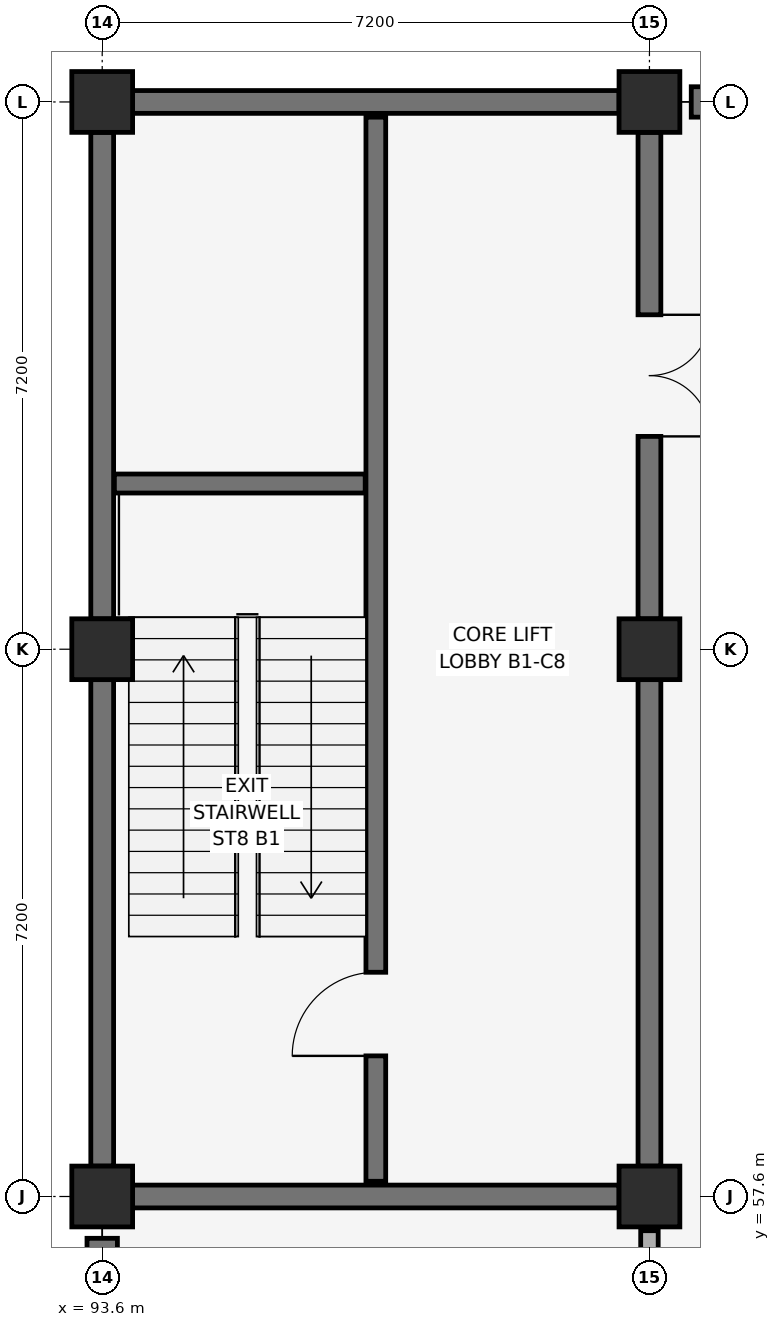
"""IFC4 building model, lengths in metres.
Left out: names, types, materials, properties, quantities, classifications, styles, units other than length and angle.
Written with IfcOpenShell. Run it as: python <this file> out.ifc"""

import sys

from ifc_helpers import new_model, si_unit, direction, frame, frame_2d, origin, origin_2d, place, context, subcontext, project, spatial, rectangle, circle, extrude, element, fill, save


model = new_model("IFC4")
c1 = context("Model", 3, precision=1e-05, world=origin(), true_north=direction((0.0, 1.0)))
c2 = subcontext(c1, "Body", "Model", "MODEL_VIEW")
j1 = project(units=[si_unit("LENGTHUNIT", "METRE"), si_unit("PLANEANGLEUNIT", "RADIAN")], contexts=[c1])
p1 = place(None, origin())
s1 = spatial("IfcSite", under=j1, at=p1, CompositionType="ELEMENT")
p2 = place(p1, origin())
s2 = spatial("IfcBuilding", under=s1, at=p2, CompositionType="ELEMENT")
p3 = place(p2, frame((0.0, 0.0, -5.4)))
s3 = spatial("IfcBuildingStorey", under=s2, at=p3, CompositionType="ELEMENT", Elevation=-5.4)
for number, where, z_axis, x_axis in (
    (1, (93.6, 57.6, -0.45), (0.0, 0.0, 1.0), (1.0, 0.0, 0.0)),
    (2, (93.6, 64.8, -0.45), (0.0, 0.0, 1.0), (1.0, 0.0, 0.0)),
    (3, (93.6, 72.0, -0.45), (0.0, 0.0, 1.0), (1.0, 0.0, 0.0)),
):
    element("IfcColumn", number, at=place(p3, frame(where, z_axis=z_axis, x_axis=x_axis)), inside=s3, PredefinedType="COLUMN", context=c2, shape_type="SweptSolid", body=[
        extrude(rectangle(XDim=0.8, YDim=0.8, at=origin_2d()), origin(), (0.0, 0.0, 1.0), 5.85),
    ])
for number, where, z_axis, x_axis in (
    (4, (100.8, 57.6, -0.45), (0.0, 0.0, 1.0), (1.0, 0.0, 0.0)),
    (5, (100.8, 64.8, -0.45), (0.0, 0.0, 1.0), (1.0, 0.0, 0.0)),
    (6, (100.8, 72.0, -0.45), (0.0, 0.0, 1.0), (1.0, 0.0, 0.0)),
):
    element("IfcColumn", number, at=place(p3, frame(where, z_axis=z_axis, x_axis=x_axis)), inside=s3, PredefinedType="COLUMN", context=c2, shape_type="SweptSolid", body=[
        extrude(circle(Radius=0.4, at=origin_2d()), origin(), (0.0, 0.0, 1.0), 5.85),
    ])
p4 = place(p3, frame((101.35, 72.0, 0.0), z_axis=(0.0, 0.0, 1.0), x_axis=(1.0, 0.0, 0.0)))
e7 = element("IfcWall", 7, at=p4, inside=s3, PredefinedType="USERDEFINED", context=c2, shape_type="SweptSolid", body=[
    extrude(rectangle(XDim=6.1, YDim=0.4, at=frame_2d((3.05, 0.0))), origin(), (0.0, 0.0, 1.0), 5.12),
])
p5 = place(p3, frame((93.6, 50.95, 0.0), z_axis=(0.0, 0.0, 1.0), x_axis=(0.0, 1.0, 0.0)))
e8 = element("IfcWall", 8, at=p5, inside=s3, PredefinedType="USERDEFINED", context=c2, shape_type="SweptSolid", body=[
    extrude(rectangle(XDim=6.1, YDim=0.4, at=frame_2d((3.05, 0.0))), origin(), (0.0, 0.0, 1.0), 5.12),
])
for number, where, z_axis, x_axis in (
    (9, (94.0, 57.6, 0.0), (0.0, 0.0, 1.0), (1.0, 0.0, 0.0)),
    (10, (94.0, 72.0, 0.0), (0.0, 0.0, 1.0), (1.0, 0.0, 0.0)),
    (11, (93.6, 58.0, 0.0), (0.0, 0.0, 1.0), (0.0, 1.0, 0.0)),
):
    element("IfcWall", number, at=place(p3, frame(where, z_axis=z_axis, x_axis=x_axis)), inside=s3, PredefinedType="SHEAR", context=c2, shape_type="SweptSolid", body=[
        extrude(rectangle(XDim=6.4, YDim=0.3, at=frame_2d((3.2, 0.0))), origin(), (0.0, 0.0, 1.0), 5.12),
    ])
p6 = place(p3, frame((93.6, 65.2, 0.0), z_axis=(0.0, 0.0, 1.0), x_axis=(0.0, 1.0, 0.0)))
e12 = element("IfcWall", 12, at=p6, inside=s3, PredefinedType="SHEAR", context=c2, shape_type="SweptSolid", body=[
    extrude(rectangle(XDim=6.4, YDim=0.3, at=frame_2d((3.2, 0.0))), origin(), (0.0, 0.0, 1.0), 5.12),
])
p7 = place(p3, frame((100.8, 58.0, 0.0), z_axis=(0.0, 0.0, 1.0), x_axis=(0.0, 1.0, 0.0)))
e13 = element("IfcWall", 13, at=p7, inside=s3, PredefinedType="SHEAR", context=c2, shape_type="SweptSolid", body=[
    extrude(rectangle(XDim=6.4, YDim=0.3, at=frame_2d((3.2, 0.0))), origin(), (0.0, 0.0, 1.0), 5.12),
])
p8 = place(p3, frame((100.8, 65.2, 0.0), z_axis=(0.0, 0.0, 1.0), x_axis=(0.0, 1.0, 0.0)))
e14 = element("IfcWall", 14, at=p8, inside=s3, PredefinedType="SHEAR", context=c2, shape_type="SweptSolid", body=[
    extrude(rectangle(XDim=6.4, YDim=0.3, at=frame_2d((3.2, 0.0))), origin(), (0.0, 0.0, 1.0), 5.12),
])
p9 = place(p8, frame((2.4, 0.0, 0.0)))
e15 = element("IfcOpeningElement", 15, at=p9, cuts=e14, PredefinedType="OPENING", context=c2, shape_type="SweptSolid", body=[
    extrude(rectangle(XDim=1.6, YDim=2.2, at=frame_2d((0.8, 1.1))), frame((0.0, 0.165, 0.0), z_axis=(0.0, -1.0, 0.0), x_axis=(1.0, 0.0, 0.0)), (0.0, 0.0, 1.0), 0.33),
])
p10 = place(p3, frame((97.2, 57.8, 0.0), z_axis=(0.0, 0.0, 1.0), x_axis=(0.0, 1.0, 0.0)))
e16 = element("IfcWall", 16, at=p10, inside=s3, PredefinedType="SHEAR", context=c2, shape_type="SweptSolid", body=[
    extrude(rectangle(XDim=14.0, YDim=0.26, at=frame_2d((7.0, 0.0))), origin(), (0.0, 0.0, 1.0), 5.12),
])
p11 = place(p10, frame((1.65, 0.0, 0.0)))
e17 = element("IfcOpeningElement", 17, at=p11, cuts=e16, PredefinedType="OPENING", context=c2, shape_type="SweptSolid", body=[
    extrude(rectangle(XDim=1.1, YDim=2.15, at=frame_2d((0.55, 1.075))), frame((0.0, 0.145, 0.0), z_axis=(0.0, -1.0, 0.0), x_axis=(1.0, 0.0, 0.0)), (0.0, 0.0, 1.0), 0.29),
])
p12 = place(p3, frame((93.76, 66.98, 0.0), z_axis=(0.0, 0.0, 1.0), x_axis=(1.0, 0.0, 0.0)))
e18 = element("IfcWall", 18, at=p12, inside=s3, PredefinedType="SHEAR", context=c2, shape_type="SweptSolid", body=[
    extrude(rectangle(XDim=3.3, YDim=0.25, at=frame_2d((1.65, 0.0))), origin(), (0.0, 0.0, 1.0), 5.12),
])
p13 = place(p3, frame((100.8, 50.85, 0.0), z_axis=(0.0, 0.0, 1.0), x_axis=(0.0, 1.0, 0.0)))
e19 = element("IfcWall", 19, at=p13, inside=s3, PredefinedType="SOLIDWALL", context=c2, shape_type="SweptSolid", body=[
    extrude(rectangle(XDim=6.3, YDim=0.23, at=frame_2d((3.15, 0.0))), origin(), (0.0, 0.0, 1.0), 4.37),
])
p14 = place(p11, origin())
e20 = element("IfcDoor", 20, at=p14, inside=s3, OperationType="SINGLE_SWING_LEFT", PredefinedType="DOOR", context=c2, shape_type="SweptSolid", body=[
    extrude(rectangle(XDim=1.1, YDim=2.15, at=frame_2d((0.55, 1.075))), frame((0.0, 0.025, 0.0), z_axis=(0.0, -1.0, 0.0), x_axis=(1.0, 0.0, 0.0)), (0.0, 0.0, 1.0), 0.05),
])
fill(e17, e20)
p15 = place(p9, frame((1.6, 0.0, 0.0), z_axis=(0.0, 0.0, 1.0), x_axis=(-1.0, 0.0, 0.0)))
e21 = element("IfcDoor", 21, at=p15, inside=s3, OperationType="DOUBLE_SWING_LEFT", PredefinedType="DOOR", context=c2, shape_type="SweptSolid", body=[
    extrude(rectangle(XDim=1.6, YDim=2.2, at=frame_2d((0.8, 1.1))), frame((0.0, 0.025, 0.0), z_axis=(0.0, -1.0, 0.0), x_axis=(1.0, 0.0, 0.0)), (0.0, 0.0, 1.0), 0.05),
])
fill(e15, e21)
save(model, sys.argv[1])
